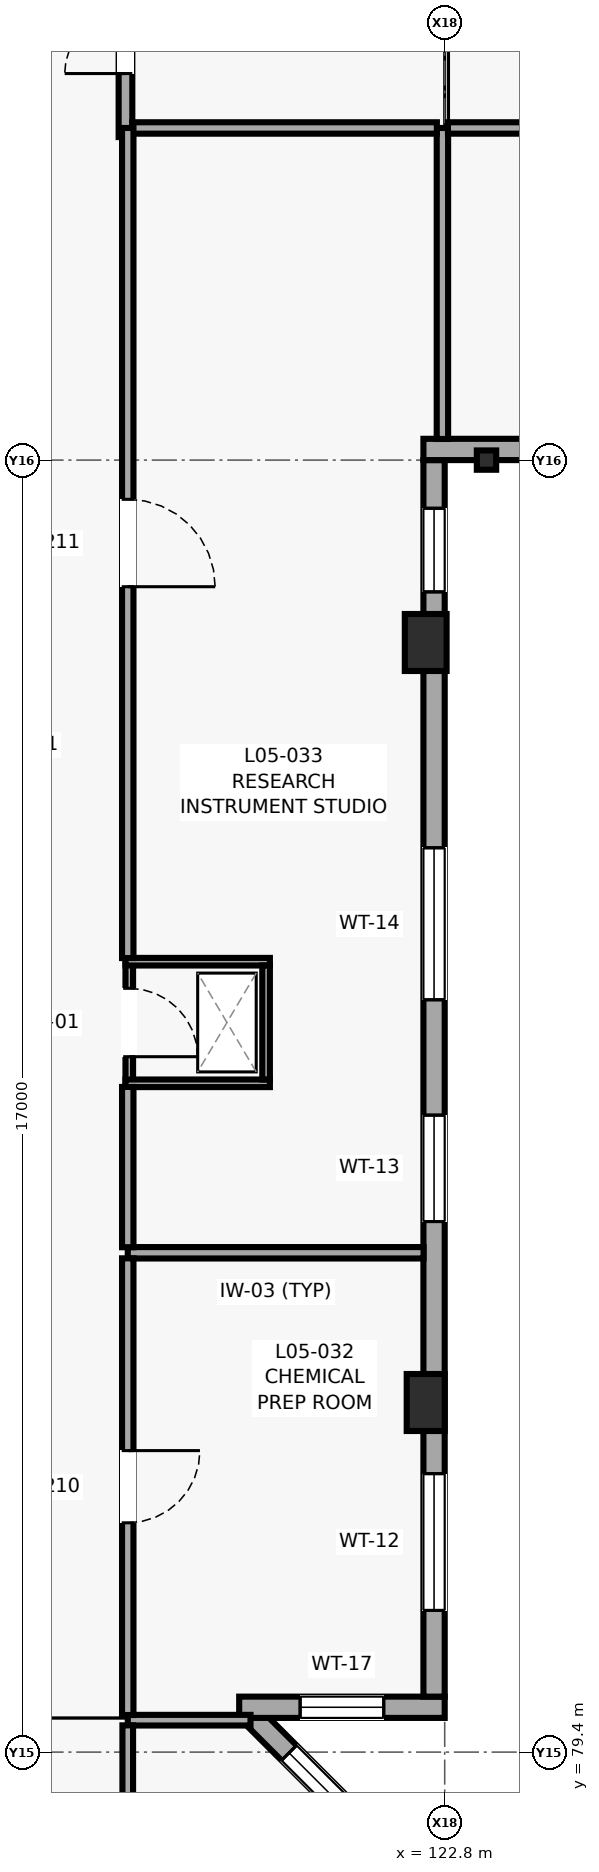
"""IFC4 building model, lengths in metres.
Left out: names, types, materials, properties, quantities, classifications, styles, units other than length and angle.
Written with IfcOpenShell. Run it as: python <this file> out.ifc"""

import sys

from ifc_helpers import new_model, si_unit, direction, frame, frame_2d, origin, origin_2d, place, context, subcontext, project, spatial, polyline, rectangle, i_section, outline, extrude, element, fill, save


model = new_model("IFC4")
c1 = context("Model", 3, precision=1e-05, world=origin(), true_north=direction((0.0, 1.0)))
c2 = subcontext(c1, "Body", "Model", "MODEL_VIEW")
j1 = project(units=[si_unit("LENGTHUNIT", "METRE"), si_unit("PLANEANGLEUNIT", "RADIAN")], contexts=[c1])
p1 = place(None, origin())
s1 = spatial("IfcSite", under=j1, at=p1, CompositionType="ELEMENT")
p2 = place(p1, origin())
s2 = spatial("IfcBuilding", under=s1, at=p2, CompositionType="ELEMENT")
p3 = place(p2, frame((0.0, 0.0, 20.2)))
s3 = spatial("IfcBuildingStorey", under=s2, at=p3, CompositionType="ELEMENT", Elevation=20.2)
p4 = place(p3, frame((122.55, 84.0, 0.0), z_axis=(0.0, 0.0, 1.0), x_axis=(1.0, 0.0, 0.0)))
e1 = element("IfcColumn", 1, at=p4, inside=s3, PredefinedType="COLUMN", context=c2, shape_type="SweptSolid", body=[
    extrude(rectangle(XDim=0.5, YDim=0.75, at=origin_2d()), origin(), (0.0, 0.0, 1.0), 4.0),
])
p5 = place(p3, frame((122.55, 94.0, 0.0), z_axis=(0.0, 0.0, 1.0), x_axis=(1.0, 0.0, 0.0)))
e2 = element("IfcColumn", 2, at=p5, inside=s3, PredefinedType="COLUMN", context=c2, shape_type="SweptSolid", body=[
    extrude(rectangle(XDim=0.55, YDim=0.75, at=origin_2d()), origin(), (0.0, 0.0, 1.0), 4.0),
])
p6 = place(p3, frame((123.35, 96.4, 0.0), z_axis=(0.0, 0.0, 1.0), x_axis=(1.0, 0.0, 0.0)))
e3 = element("IfcColumn", 3, at=p6, inside=s3, PredefinedType="COLUMN", context=c2, shape_type="SweptSolid", body=[
    extrude(i_section(OverallWidth=0.255, OverallDepth=0.254, WebThickness=0.009, FlangeThickness=0.014, FilletRadius=0.013, at=origin_2d()), origin(), (0.0, 0.0, 1.0), 4.0),
])
p7 = place(p3, frame((122.616, 77.526, 0.0), z_axis=(0.0, 0.0, 1.0), x_axis=(-0.707071112858, 0.707142447716, 0.0)))
e4 = element("IfcWall", 4, at=p7, inside=s3, PredefinedType="SOLIDWALL", context=c2, shape_type="SweptSolid", body=[
    extrude(rectangle(XDim=3.422, YDim=0.28, at=frame_2d((1.711, 0.0))), origin(), (0.0, 0.0, 1.0), 3.78),
])
p8 = place(p7, frame((0.786, 0.0, 1.05)))
e5 = element("IfcOpeningElement", 5, at=p8, cuts=e4, PredefinedType="OPENING", context=c2, shape_type="SweptSolid", body=[
    extrude(rectangle(XDim=1.85, YDim=1.4, at=frame_2d((0.925, 0.7))), frame((0.0, 0.15, 0.0), z_axis=(0.0, -1.0, 0.0), x_axis=(1.0, 0.0, 0.0)), (0.0, 0.0, 1.0), 0.3),
])
p9 = place(p3, frame((120.096, 79.99, 0.0), z_axis=(0.0, 0.0, 1.0), x_axis=(1.0, 0.0, 0.0)))
e6 = element("IfcWall", 6, at=p9, inside=s3, PredefinedType="SOLIDWALL", context=c2, shape_type="SweptSolid", body=[
    extrude(rectangle(XDim=2.704, YDim=0.28, at=frame_2d((1.352, 0.0))), origin(), (0.0, 0.0, 1.0), 3.78),
])
p10 = place(p9, frame((0.802, 0.0, 0.75)))
e7 = element("IfcOpeningElement", 7, at=p10, cuts=e6, PredefinedType="OPENING", context=c2, shape_type="SweptSolid", body=[
    extrude(rectangle(XDim=1.1, YDim=2.1, at=frame_2d((0.55, 1.05))), frame((0.0, 0.15, 0.0), z_axis=(0.0, -1.0, 0.0), x_axis=(1.0, 0.0, 0.0)), (0.0, 0.0, 1.0), 0.3),
])
p11 = place(p3, frame((122.66, 80.13, 0.0), z_axis=(0.0, 0.0, 1.0), x_axis=(0.0, 1.0, 0.0)))
e8 = element("IfcWall", 8, at=p11, inside=s3, PredefinedType="SOLIDWALL", context=c2, shape_type="SweptSolid", body=[
    extrude(rectangle(XDim=16.27, YDim=0.28, at=frame_2d((8.135, 0.0))), origin(), (0.0, 0.0, 1.0), 3.205),
])
p12 = place(p11, frame((1.134, 0.0, 0.75)))
e9 = element("IfcOpeningElement", 9, at=p12, cuts=e8, PredefinedType="OPENING", context=c2, shape_type="SweptSolid", body=[
    extrude(rectangle(XDim=1.8, YDim=2.25, at=frame_2d((0.9, 1.125))), frame((0.0, 0.15, 0.0), z_axis=(0.0, -1.0, 0.0), x_axis=(1.0, 0.0, 0.0)), (0.0, 0.0, 1.0), 0.3),
])
p13 = place(p11, frame((6.251, 0.0, 0.665)))
e10 = element("IfcOpeningElement", 10, at=p13, cuts=e8, PredefinedType="OPENING", context=c2, shape_type="SweptSolid", body=[
    extrude(rectangle(XDim=1.4, YDim=2.4, at=frame_2d((0.7, 1.2))), frame((0.0, 0.15, 0.0), z_axis=(0.0, -1.0, 0.0), x_axis=(1.0, 0.0, 0.0)), (0.0, 0.0, 1.0), 0.3),
])
p14 = place(p11, frame((9.169, 0.0, 0.75)))
e11 = element("IfcOpeningElement", 11, at=p14, cuts=e8, PredefinedType="OPENING", context=c2, shape_type="SweptSolid", body=[
    extrude(rectangle(XDim=2.0, YDim=2.1, at=frame_2d((1.0, 1.05))), frame((0.0, 0.15, 0.0), z_axis=(0.0, -1.0, 0.0), x_axis=(1.0, 0.0, 0.0)), (0.0, 0.0, 1.0), 0.3),
])
p15 = place(p11, frame((14.536, 0.0, 0.75)))
e12 = element("IfcOpeningElement", 12, at=p15, cuts=e8, PredefinedType="OPENING", context=c2, shape_type="SweptSolid", body=[
    extrude(rectangle(XDim=1.1, YDim=2.1, at=frame_2d((0.55, 1.05))), frame((0.0, 0.15, 0.0), z_axis=(0.0, -1.0, 0.0), x_axis=(1.0, 0.0, 0.0)), (0.0, 0.0, 1.0), 0.3),
])
p16 = place(p3, frame((122.52, 96.54, 0.0), z_axis=(0.0, 0.0, 1.0), x_axis=(1.0, 0.0, 0.0)))
e13 = element("IfcWall", 13, at=p16, inside=s3, PredefinedType="SOLIDWALL", context=c2, shape_type="SweptSolid", body=[
    extrude(rectangle(XDim=11.919, YDim=0.28, at=frame_2d((5.959, 0.0))), origin(), (0.0, 0.0, 1.0), 3.005),
])
p17 = place(p16, frame((1.436, 0.0, 0.75)))
e14 = element("IfcOpeningElement", 14, at=p17, cuts=e13, PredefinedType="OPENING", context=c2, shape_type="SweptSolid", body=[
    extrude(rectangle(XDim=1.1, YDim=2.1, at=frame_2d((0.55, 1.05))), frame((0.0, 0.15, 0.0), z_axis=(0.0, -1.0, 0.0), x_axis=(1.0, 0.0, 0.0)), (0.0, 0.0, 1.0), 0.3),
])
p18 = place(p16, frame((5.184, 0.0, 0.85)))
e15 = element("IfcOpeningElement", 15, at=p18, cuts=e13, PredefinedType="OPENING", context=c2, shape_type="SweptSolid", body=[
    extrude(rectangle(XDim=1.55, YDim=1.85, at=frame_2d((0.775, 0.925))), frame((0.0, 0.15, 0.0), z_axis=(0.0, -1.0, 0.0), x_axis=(1.0, 0.0, 0.0)), (0.0, 0.0, 1.0), 0.3),
])
p19 = place(p16, frame((9.057, 0.0, 0.75)))
e16 = element("IfcOpeningElement", 16, at=p19, cuts=e13, PredefinedType="OPENING", context=c2, shape_type="SweptSolid", body=[
    extrude(rectangle(XDim=1.75, YDim=2.05, at=frame_2d((0.875, 1.025))), frame((0.0, 0.15, 0.0), z_axis=(0.0, -1.0, 0.0), x_axis=(1.0, 0.0, 0.0)), (0.0, 0.0, 1.0), 0.3),
])
p20 = place(p3, frame((122.673, 77.828, 4.0), z_axis=(0.0, 0.0, 1.0), x_axis=(-0.707106781187, 0.707106781187, 0.0)))
e17 = element("IfcWall", 17, at=p20, inside=s3, PredefinedType="PARAPET", context=c2, shape_type="SweptSolid", body=[
    extrude(rectangle(XDim=2.68, YDim=0.165, at=frame_2d((1.34, 0.0))), origin(), (0.0, 0.0, 1.0), 1.12),
])
p21 = place(p3, frame((120.788, 79.752, 4.0), z_axis=(0.0, 0.0, 1.0), x_axis=(-1.0, 0.0, 0.0)))
e18 = element("IfcWall", 18, at=p21, inside=s3, PredefinedType="PARAPET", context=c2, shape_type="SweptSolid", body=[
    extrude(outline(polyline([(0.0, 0.0), (12.387, 0.0), (12.387, 1.12), (8.423, 1.12), (8.373, 1.46), (4.014, 1.46), (3.964, 1.12), (0.0, 1.12), (0.0, 0.0)])), frame((0.0, 0.098, 0.0), z_axis=(0.0, -1.0, 0.0), x_axis=(1.0, 0.0, 0.0)), (0.0, 0.0, 1.0), 0.195),
])
p22 = place(p3, frame((122.702, 80.045, 4.0), z_axis=(0.0, 0.0, 1.0), x_axis=(0.0, 1.0, 0.0)))
e19 = element("IfcWall", 19, at=p22, inside=s3, PredefinedType="PARAPET", context=c2, shape_type="SweptSolid", body=[
    extrude(outline(polyline([(0.0, 0.0), (23.96, 0.0), (23.96, 1.12), (16.293, 1.12), (16.243, 1.46), (7.717, 1.46), (7.667, 1.12), (0.0, 1.12), (0.0, 0.0)])), frame((0.0, 0.098, 0.0), z_axis=(0.0, -1.0, 0.0), x_axis=(1.0, 0.0, 0.0)), (0.0, 0.0, 1.0), 0.195),
])
p23 = place(p3, frame((115.6, 79.948, 4.0), z_axis=(0.0, 0.0, 1.0), x_axis=(1.0, 0.0, 0.0)))
e20 = element("IfcWall", 20, at=p23, inside=s3, PredefinedType="PARAPET", context=c2, shape_type="SweptSolid", body=[
    extrude(rectangle(XDim=7.199, YDim=0.195, at=frame_2d((3.6, 0.0))), origin(), (0.0, 0.0, 1.0), 1.12),
])
p24 = place(p3, frame((122.948, 111.805, 4.0), z_axis=(0.0, 0.0, 1.0), x_axis=(0.0, -1.0, 0.0)))
e21 = element("IfcWall", 21, at=p24, inside=s3, PredefinedType="PARAPET", context=c2, shape_type="SweptSolid", body=[
    extrude(outline(polyline([(0.0, 0.0), (15.209, 0.0), (15.209, 1.12), (10.342, 1.12), (10.292, 1.46), (4.917, 1.46), (4.867, 1.12), (0.0, 1.12), (0.0, 0.0)])), frame((0.0, 0.098, 0.0), z_axis=(0.0, -1.0, 0.0), x_axis=(1.0, 0.0, 0.0)), (0.0, 0.0, 1.0), 0.195),
])
p25 = place(p3, frame((122.85, 96.498, 4.0), z_axis=(0.0, 0.0, 1.0), x_axis=(1.0, 0.0, 0.0)))
e22 = element("IfcWall", 22, at=p25, inside=s3, PredefinedType="PARAPET", context=c2, shape_type="SweptSolid", body=[
    extrude(outline(polyline([(0.0, 0.0), (11.589, 0.0), (11.589, 1.12), (7.881, 1.12), (7.831, 1.46), (3.758, 1.46), (3.708, 1.12), (0.0, 1.12), (0.0, 0.0)])), frame((0.0, 0.098, 0.0), z_axis=(0.0, -1.0, 0.0), x_axis=(1.0, 0.0, 0.0)), (0.0, 0.0, 1.0), 0.195),
])
p26 = place(p3, frame((118.6, 100.65, 0.0), z_axis=(0.0, 0.0, 1.0), x_axis=(0.0, 1.0, 0.0)))
e23 = element("IfcWall", 23, at=p26, inside=s3, PredefinedType="PARTITIONING", context=c2, shape_type="SweptSolid", body=[
    extrude(rectangle(XDim=3.272, YDim=0.18, at=frame_2d((1.636, 0.0))), origin(), (0.0, 0.0, 1.0), 3.78),
])
p27 = place(p26, frame((0.836, 0.0, 0.0)))
e24 = element("IfcOpeningElement", 24, at=p27, cuts=e23, PredefinedType="OPENING", context=c2, shape_type="SweptSolid", body=[
    extrude(rectangle(XDim=1.6, YDim=2.25, at=frame_2d((0.8, 1.125))), frame((0.0, 0.1, 0.0), z_axis=(0.0, -1.0, 0.0), x_axis=(1.0, 0.0, 0.0)), (0.0, 0.0, 1.0), 0.2),
])
p28 = place(p3, frame((118.65, 88.2, 0.0), z_axis=(0.0, 0.0, 1.0), x_axis=(0.0, 1.0, 0.0)))
e25 = element("IfcWall", 25, at=p28, inside=s3, PredefinedType="PARTITIONING", context=c2, shape_type="SweptSolid", body=[
    extrude(rectangle(XDim=1.6, YDim=0.1, at=frame_2d((0.8, 0.0))), origin(), (0.0, 0.0, 1.0), 3.205),
])
p29 = place(p28, frame((0.35, 0.0, 0.0)))
e26 = element("IfcOpeningElement", 26, at=p29, cuts=e25, PredefinedType="OPENING", context=c2, shape_type="SweptSolid", body=[
    extrude(rectangle(XDim=0.9, YDim=2.05, at=frame_2d((0.45, 1.025))), frame((0.0, 0.06, 0.0), z_axis=(0.0, -1.0, 0.0), x_axis=(1.0, 0.0, 0.0)), (0.0, 0.0, 1.0), 0.12),
])
for number, where, z_axis, x_axis in (
    (27, (118.6, 88.2, 0.0), (0.0, 0.0, 1.0), (1.0, 0.0, 0.0)),
    (28, (118.6, 89.8, 0.0), (0.0, 0.0, 1.0), (1.0, 0.0, 0.0)),
):
    element("IfcWall", number, at=place(p3, frame(where, z_axis=z_axis, x_axis=x_axis)), inside=s3, PredefinedType="PARTITIONING", context=c2, shape_type="SweptSolid", body=[
        extrude(rectangle(XDim=1.9, YDim=0.1, at=frame_2d((0.95, 0.0))), origin(), (0.0, 0.0, 1.0), 3.78),
    ])
p30 = place(p3, frame((120.45, 88.25, 0.0), z_axis=(0.0, 0.0, 1.0), x_axis=(0.0, 1.0, 0.0)))
e29 = element("IfcWall", 29, at=p30, inside=s3, PredefinedType="PARTITIONING", context=c2, shape_type="SweptSolid", body=[
    extrude(rectangle(XDim=1.5, YDim=0.1, at=frame_2d((0.75, 0.0))), origin(), (0.0, 0.0, 1.0), 3.78),
])
p31 = place(p3, frame((120.245, 79.82, 0.0), z_axis=(0.0, 0.0, 1.0), x_axis=(-1.0, 0.0, 0.0)))
e30 = element("IfcWall", 30, at=p31, inside=s3, PredefinedType="PARTITIONING", context=c2, shape_type="SweptSolid", body=[
    extrude(rectangle(XDim=1.615, YDim=0.14, at=frame_2d((0.808, 0.0))), origin(), (0.0, 0.0, 1.0), 3.755),
])
p32 = place(p3, frame((118.63, 79.752, 0.0), z_axis=(0.0, 0.0, 1.0), x_axis=(0.0, -1.0, 0.0)))
e31 = element("IfcWall", 31, at=p32, inside=s3, PredefinedType="PARTITIONING", context=c2, shape_type="SweptSolid", body=[
    extrude(rectangle(XDim=7.874, YDim=0.14, at=frame_2d((3.937, 0.0))), origin(), (0.0, 0.0, 1.0), 3.755),
])
p33 = place(p32, frame((3.347, 0.0, 0.0)))
e32 = element("IfcOpeningElement", 32, at=p33, cuts=e31, PredefinedType="OPENING", context=c2, shape_type="SweptSolid", body=[
    extrude(rectangle(XDim=1.18, YDim=2.2, at=frame_2d((0.59, 1.1))), frame((0.0, 0.08, 0.0), z_axis=(0.0, -1.0, 0.0), x_axis=(1.0, 0.0, 0.0)), (0.0, 0.0, 1.0), 0.16),
])
p34 = place(p32, frame((5.227, 0.0, 1.05)))
e33 = element("IfcOpeningElement", 33, at=p34, cuts=e31, PredefinedType="OPENING", context=c2, shape_type="SweptSolid", body=[
    extrude(rectangle(XDim=1.6, YDim=1.1, at=frame_2d((0.8, 0.55))), frame((0.0, 0.08, 0.0), z_axis=(0.0, -1.0, 0.0), x_axis=(1.0, 0.0, 0.0)), (0.0, 0.0, 1.0), 0.16),
])
p35 = place(p3, frame((122.522, 85.97, 0.0), z_axis=(0.0, 0.0, 1.0), x_axis=(-1.0, 0.0, 0.0)))
e34 = element("IfcWall", 34, at=p35, inside=s3, PredefinedType="PARTITIONING", context=c2, shape_type="SweptSolid", body=[
    extrude(rectangle(XDim=3.892, YDim=0.15, at=frame_2d((1.946, 0.0))), origin(), (0.0, 0.0, 1.0), 3.755),
])
p36 = place(p3, frame((118.63, 85.897, 0.0), z_axis=(0.0, 0.0, 1.0), x_axis=(0.0, -1.0, 0.0)))
e35 = element("IfcWall", 35, at=p36, inside=s3, PredefinedType="PARTITIONING", context=c2, shape_type="SweptSolid", body=[
    extrude(rectangle(XDim=6.009, YDim=0.15, at=frame_2d((3.004, 0.0))), origin(), (0.0, 0.0, 1.0), 3.205),
])
p37 = place(p36, frame((2.53, 0.0, 0.0)))
e36 = element("IfcOpeningElement", 36, at=p37, cuts=e35, PredefinedType="OPENING", context=c2, shape_type="SweptSolid", body=[
    extrude(rectangle(XDim=0.95, YDim=2.1, at=frame_2d((0.475, 1.05))), frame((0.0, 0.085, 0.0), z_axis=(0.0, -1.0, 0.0), x_axis=(1.0, 0.0, 0.0)), (0.0, 0.0, 1.0), 0.17),
])
p38 = place(p3, frame((122.77, 96.678, 0.0), z_axis=(0.0, 0.0, 1.0), x_axis=(0.0, 1.0, 0.0)))
e37 = element("IfcWall", 37, at=p38, inside=s3, PredefinedType="PARTITIONING", context=c2, shape_type="SweptSolid", body=[
    extrude(rectangle(XDim=4.092, YDim=0.15, at=frame_2d((2.046, 0.0))), origin(), (0.0, 0.0, 1.0), 3.755),
])
p39 = place(p3, frame((122.697, 100.77, 0.0), z_axis=(0.0, 0.0, 1.0), x_axis=(-1.0, 0.0, 0.0)))
e38 = element("IfcWall", 38, at=p39, inside=s3, PredefinedType="PARTITIONING", context=c2, shape_type="SweptSolid", body=[
    extrude(rectangle(XDim=4.009, YDim=0.15, at=frame_2d((2.004, 0.0))), origin(), (0.0, 0.0, 1.0), 3.755),
])
p40 = place(p3, frame((118.63, 100.77, 0.0), z_axis=(0.0, 0.0, 1.0), x_axis=(0.0, -1.0, 0.0)))
e39 = element("IfcWall", 39, at=p40, inside=s3, PredefinedType="PARTITIONING", context=c2, shape_type="SweptSolid", body=[
    extrude(rectangle(XDim=10.922, YDim=0.15, at=frame_2d((5.461, 0.0))), origin(), (0.0, 0.0, 1.0), 3.205),
])
p41 = place(p40, frame((4.886, 0.0, 0.0)))
e40 = element("IfcOpeningElement", 40, at=p41, cuts=e39, PredefinedType="OPENING", context=c2, shape_type="SweptSolid", body=[
    extrude(rectangle(XDim=1.15, YDim=2.2, at=frame_2d((0.575, 1.1))), frame((0.0, 0.085, 0.0), z_axis=(0.0, -1.0, 0.0), x_axis=(1.0, 0.0, 0.0)), (0.0, 0.0, 1.0), 0.17),
])
p42 = place(p3, frame((118.63, 88.152, 0.0), z_axis=(0.0, 0.0, 1.0), x_axis=(0.0, -1.0, 0.0)))
e41 = element("IfcWall", 41, at=p42, inside=s3, PredefinedType="PARTITIONING", context=c2, shape_type="SweptSolid", body=[
    extrude(rectangle(XDim=2.109, YDim=0.15, at=frame_2d((1.055, 0.0))), origin(), (0.0, 0.0, 1.0), 3.205),
])
p43 = place(p3, frame((136.922, 100.77, 0.0), z_axis=(0.0, 0.0, 1.0), x_axis=(-1.0, 0.0, 0.0)))
e42 = element("IfcWall", 42, at=p43, inside=s3, PredefinedType="PARTITIONING", context=c2, shape_type="SweptSolid", body=[
    extrude(rectangle(XDim=14.079, YDim=0.15, at=frame_2d((7.04, 0.0))), origin(), (0.0, 0.0, 1.0), 3.755),
])
p44 = place(p43, frame((6.464, 0.0, 0.0)))
e43 = element("IfcOpeningElement", 43, at=p44, cuts=e42, PredefinedType="OPENING", context=c2, shape_type="SweptSolid", body=[
    extrude(rectangle(XDim=1.15, YDim=2.2, at=frame_2d((0.575, 1.1))), frame((0.0, 0.085, 0.0), z_axis=(0.0, -1.0, 0.0), x_axis=(1.0, 0.0, 0.0)), (0.0, 0.0, 1.0), 0.17),
])
p45 = place(p8, origin())
e44 = element("IfcWindow", 44, at=p45, inside=s3, PartitioningType="SINGLE_PANEL", PredefinedType="WINDOW", context=c2, shape_type="SweptSolid", body=[
    extrude(rectangle(XDim=1.85, YDim=1.4, at=frame_2d((0.925, 0.7))), frame((0.0, 0.03, 0.0), z_axis=(0.0, -1.0, 0.0), x_axis=(1.0, 0.0, 0.0)), (0.0, 0.0, 1.0), 0.06),
])
fill(e5, e44)
p46 = place(p10, origin())
e45 = element("IfcWindow", 45, at=p46, inside=s3, PartitioningType="SINGLE_PANEL", PredefinedType="WINDOW", context=c2, shape_type="SweptSolid", body=[
    extrude(rectangle(XDim=1.1, YDim=2.1, at=frame_2d((0.55, 1.05))), frame((0.0, 0.03, 0.0), z_axis=(0.0, -1.0, 0.0), x_axis=(1.0, 0.0, 0.0)), (0.0, 0.0, 1.0), 0.06),
])
fill(e7, e45)
p47 = place(p12, origin())
e46 = element("IfcWindow", 46, at=p47, inside=s3, PartitioningType="SINGLE_PANEL", PredefinedType="WINDOW", context=c2, shape_type="SweptSolid", body=[
    extrude(rectangle(XDim=1.8, YDim=2.25, at=frame_2d((0.9, 1.125))), frame((0.0, 0.03, 0.0), z_axis=(0.0, -1.0, 0.0), x_axis=(1.0, 0.0, 0.0)), (0.0, 0.0, 1.0), 0.06),
])
fill(e9, e46)
p48 = place(p13, origin())
e47 = element("IfcWindow", 47, at=p48, inside=s3, PartitioningType="SINGLE_PANEL", PredefinedType="WINDOW", context=c2, shape_type="SweptSolid", body=[
    extrude(rectangle(XDim=1.4, YDim=2.4, at=frame_2d((0.7, 1.2))), frame((0.0, 0.03, 0.0), z_axis=(0.0, -1.0, 0.0), x_axis=(1.0, 0.0, 0.0)), (0.0, 0.0, 1.0), 0.06),
])
fill(e10, e47)
p49 = place(p14, origin())
e48 = element("IfcWindow", 48, at=p49, inside=s3, PartitioningType="SINGLE_PANEL", PredefinedType="WINDOW", context=c2, shape_type="SweptSolid", body=[
    extrude(rectangle(XDim=2.0, YDim=2.1, at=frame_2d((1.0, 1.05))), frame((0.0, 0.03, 0.0), z_axis=(0.0, -1.0, 0.0), x_axis=(1.0, 0.0, 0.0)), (0.0, 0.0, 1.0), 0.06),
])
fill(e11, e48)
p50 = place(p15, origin())
e49 = element("IfcWindow", 49, at=p50, inside=s3, PartitioningType="SINGLE_PANEL", PredefinedType="WINDOW", context=c2, shape_type="SweptSolid", body=[
    extrude(rectangle(XDim=1.1, YDim=2.1, at=frame_2d((0.55, 1.05))), frame((0.0, 0.03, 0.0), z_axis=(0.0, -1.0, 0.0), x_axis=(1.0, 0.0, 0.0)), (0.0, 0.0, 1.0), 0.06),
])
fill(e12, e49)
p51 = place(p27, origin())
e50 = element("IfcDoor", 50, at=p51, inside=s3, OperationType="DOUBLE_DOOR_SINGLE_SWING", PredefinedType="DOOR", context=c2, shape_type="SweptSolid", body=[
    extrude(rectangle(XDim=1.6, YDim=2.25, at=frame_2d((0.8, 1.125))), frame((0.0, 0.025, 0.0), z_axis=(0.0, -1.0, 0.0), x_axis=(1.0, 0.0, 0.0)), (0.0, 0.0, 1.0), 0.05),
])
fill(e24, e50)
p52 = place(p29, frame((0.9, 0.0, 0.0), z_axis=(0.0, 0.0, 1.0), x_axis=(-1.0, 0.0, 0.0)))
e51 = element("IfcDoor", 51, at=p52, inside=s3, OperationType="SINGLE_SWING_LEFT", PredefinedType="USERDEFINED", context=c2, shape_type="SweptSolid", body=[
    extrude(rectangle(XDim=0.9, YDim=2.05, at=frame_2d((0.45, 1.025))), frame((0.0, 0.025, 0.0), z_axis=(0.0, -1.0, 0.0), x_axis=(1.0, 0.0, 0.0)), (0.0, 0.0, 1.0), 0.05),
])
fill(e26, e51)
p53 = place(p37, origin())
e52 = element("IfcDoor", 52, at=p53, inside=s3, OperationType="SINGLE_SWING_LEFT", PredefinedType="DOOR", context=c2, shape_type="SweptSolid", body=[
    extrude(rectangle(XDim=0.95, YDim=2.1, at=frame_2d((0.475, 1.05))), frame((0.0, 0.025, 0.0), z_axis=(0.0, -1.0, 0.0), x_axis=(1.0, 0.0, 0.0)), (0.0, 0.0, 1.0), 0.05),
])
fill(e36, e52)
p54 = place(p41, origin())
e53 = element("IfcDoor", 53, at=p54, inside=s3, OperationType="SINGLE_SWING_RIGHT", PredefinedType="DOOR", context=c2, shape_type="SweptSolid", body=[
    extrude(rectangle(XDim=1.15, YDim=2.2, at=frame_2d((0.575, 1.1))), frame((0.0, 0.025, 0.0), z_axis=(0.0, -1.0, 0.0), x_axis=(1.0, 0.0, 0.0)), (0.0, 0.0, 1.0), 0.05),
])
fill(e40, e53)
save(model, sys.argv[1])
